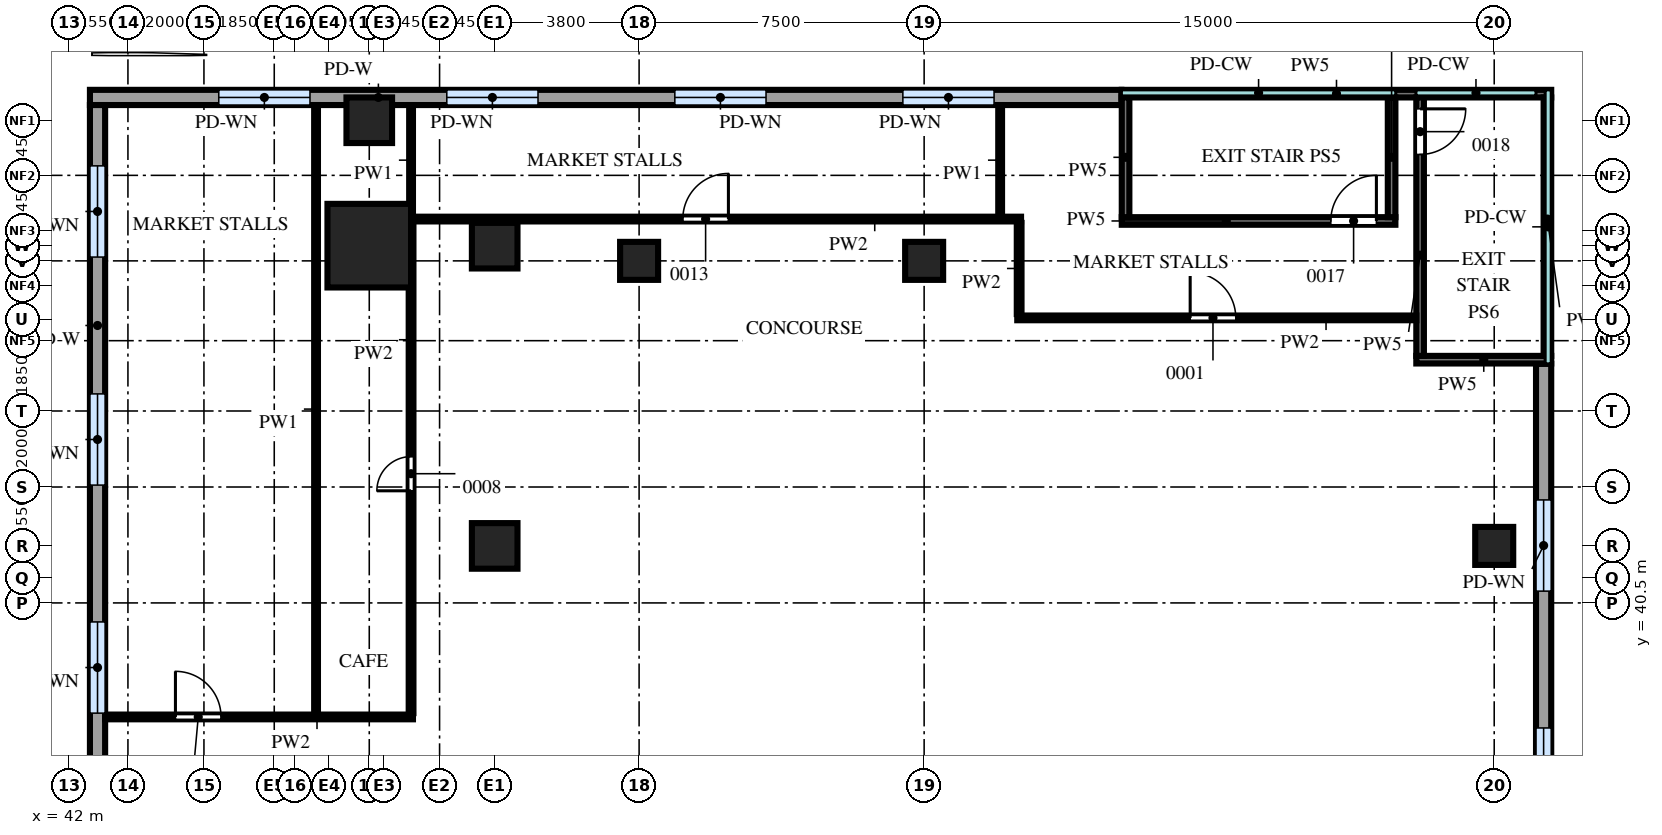
"""IFC4 building model, lengths in metres.
Left out: names, types, materials, properties, quantities, classifications, styles, units other than length and angle.
Written with IfcOpenShell. Run it as: python <this file> out.ifc"""

import sys

from ifc_helpers import new_model, si_unit, direction, frame, frame_2d, origin, origin_2d, place, context, subcontext, project, spatial, rectangle, extrude, source, transform, mapped, element, fill, save


model = new_model("IFC4")
c1 = context("Model", 3, precision=1e-05, world=origin(), true_north=direction((0.0, 1.0)))
c2 = subcontext(c1, "Body", "Model", "MODEL_VIEW")
j1 = project(units=[si_unit("LENGTHUNIT", "METRE"), si_unit("PLANEANGLEUNIT", "RADIAN")], contexts=[c1])
p1 = place(None, origin())
s1 = spatial("IfcSite", under=j1, at=p1, CompositionType="ELEMENT")
p2 = place(p1, origin())
s2 = spatial("IfcBuilding", under=s1, at=p2, CompositionType="ELEMENT")
p3 = place(p2, frame((0.0, 0.0, 7.5)))
s3 = spatial("IfcBuildingStorey", under=s2, at=p3, CompositionType="ELEMENT", Elevation=7.5)
m1 = source(origin(), c2, "Body", "SweptSolid", [
    extrude(rectangle(XDim=2.2, YDim=2.2, at=origin_2d()), origin(), (0.0, 0.0, 1.0), 5.2),
])
p4 = place(p3, frame((49.9, 49.9, 0.0), z_axis=(0.0, 0.0, 1.0), x_axis=(1.0, 0.0, 0.0)))
e1 = element("IfcColumn", 1, at=p4, inside=s3, PredefinedType="COLUMN", context=c2, shape_type="MappedRepresentation", body=[
    mapped(m1, transform((0.0, 0.0, 0.0))),
])
m2 = source(origin(), c2, "Body", "SweptSolid", [
    extrude(rectangle(XDim=1.2, YDim=1.2, at=origin_2d()), origin(), (0.0, 0.0, 1.0), 5.2),
])
for number, where, z_axis, x_axis in (
    (2, (53.2, 42.0, 0.0), (0.0, 0.0, 1.0), (1.0, 0.0, 0.0)),
    (3, (53.2, 49.9, 0.0), (0.0, 0.0, 1.0), (1.0, 0.0, 0.0)),
    (4, (49.9, 53.2, 0.0), (0.0, 0.0, 1.0), (1.0, 0.0, 0.0)),
):
    element("IfcColumn", number, at=place(p3, frame(where, z_axis=z_axis, x_axis=x_axis)), inside=s3, PredefinedType="COLUMN", context=c2, shape_type="MappedRepresentation", body=[
        mapped(m2, transform((0.0, 0.0, 0.0))),
    ])
m3 = source(origin(), c2, "Body", "SweptSolid", [
    extrude(rectangle(XDim=1.0, YDim=1.0, at=origin_2d()), origin(), (0.0, 0.0, 1.0), 5.2),
])
for number, where, z_axis, x_axis in (
    (5, (57.0, 49.5, 0.0), (0.0, 0.0, 1.0), (1.0, 0.0, 0.0)),
    (6, (64.5, 49.5, 0.0), (0.0, 0.0, 1.0), (1.0, 0.0, 0.0)),
    (7, (79.5, 42.0, 0.0), (0.0, 0.0, 1.0), (1.0, 0.0, 0.0)),
):
    element("IfcColumn", number, at=place(p3, frame(where, z_axis=z_axis, x_axis=x_axis)), inside=s3, PredefinedType="COLUMN", context=c2, shape_type="MappedRepresentation", body=[
        mapped(m3, transform((0.0, 0.0, 0.0))),
    ])
m4 = source(origin(), c2, "Body", "SweptSolid", [
    extrude(rectangle(XDim=39.58, YDim=0.4, at=frame_2d((19.79, 0.0))), origin(), (0.0, 0.0, 1.0), 5.2),
])
p5 = place(p3, frame((80.8, 7.21, 0.0), z_axis=(0.0, 0.0, 1.0), x_axis=(0.0, 1.0, 0.0)))
e8 = element("IfcWall", 8, at=p5, inside=s3, PredefinedType="SOLIDWALL", context=c2, shape_type="MappedRepresentation", body=[
    mapped(m4, transform((0.0, 0.0, 0.0))),
])
m5 = source(origin(), c2, "Body", "SweptSolid", [
    extrude(rectangle(XDim=2.4, YDim=2.4, at=frame_2d((1.2, 1.2))), frame((0.0, 0.21, 0.0), z_axis=(0.0, -1.0, 0.0), x_axis=(1.0, 0.0, 0.0)), (0.0, 0.0, 1.0), 0.42),
])
p6 = place(p5, frame((3.6, 0.0, 1.0)))
e9 = element("IfcOpeningElement", 9, at=p6, cuts=e8, PredefinedType="OPENING", context=c2, shape_type="MappedRepresentation", body=[
    mapped(m5, transform((0.0, 0.0, 0.0))),
])
p7 = place(p5, frame((9.6, 0.0, 1.0)))
e10 = element("IfcOpeningElement", 10, at=p7, cuts=e8, PredefinedType="OPENING", context=c2, shape_type="MappedRepresentation", body=[
    mapped(m5, transform((0.0, 0.0, 0.0))),
])
p8 = place(p5, frame((15.6, 0.0, 1.0)))
e11 = element("IfcOpeningElement", 11, at=p8, cuts=e8, PredefinedType="OPENING", context=c2, shape_type="MappedRepresentation", body=[
    mapped(m5, transform((0.0, 0.0, 0.0))),
])
p9 = place(p5, frame((21.6, 0.0, 1.0)))
e12 = element("IfcOpeningElement", 12, at=p9, cuts=e8, PredefinedType="OPENING", context=c2, shape_type="MappedRepresentation", body=[
    mapped(m5, transform((0.0, 0.0, 0.0))),
])
p10 = place(p5, frame((27.6, 0.0, 1.0)))
e13 = element("IfcOpeningElement", 13, at=p10, cuts=e8, PredefinedType="OPENING", context=c2, shape_type="MappedRepresentation", body=[
    mapped(m5, transform((0.0, 0.0, 0.0))),
])
p11 = place(p5, frame((33.6, 0.0, 1.0)))
e14 = element("IfcOpeningElement", 14, at=p11, cuts=e8, PredefinedType="OPENING", context=c2, shape_type="MappedRepresentation", body=[
    mapped(m5, transform((0.0, 0.0, 0.0))),
])
m6 = source(origin(), c2, "Body", "SweptSolid", [
    extrude(rectangle(XDim=27.14, YDim=0.4, at=frame_2d((13.57, 0.0))), origin(), (0.0, 0.0, 1.0), 5.2),
])
p12 = place(p3, frame((69.69, 53.8, 0.0), z_axis=(0.0, 0.0, 1.0), x_axis=(-1.0, 0.0, 0.0)))
e15 = element("IfcWall", 15, at=p12, inside=s3, PredefinedType="SOLIDWALL", context=c2, shape_type="MappedRepresentation", body=[
    mapped(m6, transform((0.0, 0.0, 0.0))),
])
p13 = place(p12, frame((3.35, 0.0, 1.0)))
e16 = element("IfcOpeningElement", 16, at=p13, cuts=e15, PredefinedType="OPENING", context=c2, shape_type="MappedRepresentation", body=[
    mapped(m5, transform((0.0, 0.0, 0.0))),
])
p14 = place(p12, frame((9.35, 0.0, 1.0)))
e17 = element("IfcOpeningElement", 17, at=p14, cuts=e15, PredefinedType="OPENING", context=c2, shape_type="MappedRepresentation", body=[
    mapped(m5, transform((0.0, 0.0, 0.0))),
])
p15 = place(p12, frame((15.35, 0.0, 1.0)))
e18 = element("IfcOpeningElement", 18, at=p15, cuts=e15, PredefinedType="OPENING", context=c2, shape_type="MappedRepresentation", body=[
    mapped(m5, transform((0.0, 0.0, 0.0))),
])
p16 = place(p12, frame((21.35, 0.0, 1.0)))
e19 = element("IfcOpeningElement", 19, at=p16, cuts=e15, PredefinedType="OPENING", context=c2, shape_type="MappedRepresentation", body=[
    mapped(m5, transform((0.0, 0.0, 0.0))),
])
m7 = source(origin(), c2, "Body", "SweptSolid", [
    extrude(rectangle(XDim=17.6, YDim=0.4, at=frame_2d((8.8, 0.0))), origin(), (0.0, 0.0, 1.0), 5.2),
])
p17 = place(p3, frame((42.75, 53.6, 0.0), z_axis=(0.0, 0.0, 1.0), x_axis=(0.0, -1.0, 0.0)))
e20 = element("IfcWall", 20, at=p17, inside=s3, PredefinedType="SOLIDWALL", context=c2, shape_type="MappedRepresentation", body=[
    mapped(m7, transform((0.0, 0.0, 0.0))),
])
p18 = place(p17, frame((1.6, 0.0, 1.0)))
e21 = element("IfcOpeningElement", 21, at=p18, cuts=e20, PredefinedType="OPENING", context=c2, shape_type="MappedRepresentation", body=[
    mapped(m5, transform((0.0, 0.0, 0.0))),
])
p19 = place(p17, frame((7.6, 0.0, 1.0)))
e22 = element("IfcOpeningElement", 22, at=p19, cuts=e20, PredefinedType="OPENING", context=c2, shape_type="MappedRepresentation", body=[
    mapped(m5, transform((0.0, 0.0, 0.0))),
])
p20 = place(p17, frame((13.6, 0.0, 1.0)))
e23 = element("IfcOpeningElement", 23, at=p20, cuts=e20, PredefinedType="OPENING", context=c2, shape_type="MappedRepresentation", body=[
    mapped(m5, transform((0.0, 0.0, 0.0))),
])
m8 = source(origin(), c2, "Body", "SweptSolid", [
    extrude(rectangle(XDim=7.2, YDim=0.2, at=frame_2d((3.6, 0.0))), origin(), (0.0, 0.0, 1.0), 5.2),
])
p21 = place(p3, frame((69.7, 50.55, 0.0), z_axis=(0.0, 0.0, 1.0), x_axis=(1.0, 0.0, 0.0)))
e24 = element("IfcWall", 24, at=p21, inside=s3, PredefinedType="PARTITIONING", context=c2, shape_type="MappedRepresentation", body=[
    mapped(m8, transform((0.0, 0.0, 0.0))),
])
m9 = source(origin(), c2, "Body", "SweptSolid", [
    extrude(rectangle(XDim=1.2, YDim=2.1, at=frame_2d((0.6, 1.05))), frame((0.0, 0.11, 0.0), z_axis=(0.0, -1.0, 0.0), x_axis=(1.0, 0.0, 0.0)), (0.0, 0.0, 1.0), 0.22),
])
p22 = place(p21, frame((5.5, 0.0, 0.0)))
e25 = element("IfcOpeningElement", 25, at=p22, cuts=e24, PredefinedType="OPENING", context=c2, shape_type="MappedRepresentation", body=[
    mapped(m9, transform((0.0, 0.0, 0.0))),
])
m10 = source(origin(), c2, "Body", "SweptSolid", [
    extrude(rectangle(XDim=11.3, YDim=0.2, at=frame_2d((5.65, 0.0))), origin(), (0.0, 0.0, 1.0), 5.2),
])
p23 = place(p3, frame((69.7, 53.9, 0.0), z_axis=(0.0, 0.0, 1.0), x_axis=(1.0, 0.0, 0.0)))
e26 = element("IfcWall", 26, at=p23, inside=s3, PredefinedType="PARTITIONING", context=c2, shape_type="MappedRepresentation", body=[
    mapped(m10, transform((0.0, 0.0, 0.0))),
])
m11 = source(origin(), c2, "Body", "SweptSolid", [
    extrude(rectangle(XDim=3.15, YDim=0.2, at=frame_2d((1.575, 0.0))), origin(), (0.0, 0.0, 1.0), 5.2),
])
for number, where, z_axis, x_axis in (
    (27, (69.8, 50.65, 0.0), (0.0, 0.0, 1.0), (0.0, 1.0, 0.0)),
    (28, (76.8, 50.65, 0.0), (0.0, 0.0, 1.0), (0.0, 1.0, 0.0)),
):
    element("IfcWall", number, at=place(p3, frame(where, z_axis=z_axis, x_axis=x_axis)), inside=s3, PredefinedType="PARTITIONING", context=c2, shape_type="MappedRepresentation", body=[
        mapped(m11, transform((0.0, 0.0, 0.0))),
    ])
m12 = source(origin(), c2, "Body", "SweptSolid", [
    extrude(rectangle(XDim=3.55, YDim=0.2, at=frame_2d((1.775, 0.0))), origin(), (0.0, 0.0, 1.0), 5.2),
])
p24 = place(p3, frame((77.45, 46.9, 0.0), z_axis=(0.0, 0.0, 1.0), x_axis=(1.0, 0.0, 0.0)))
e29 = element("IfcWall", 29, at=p24, inside=s3, PredefinedType="PARTITIONING", context=c2, shape_type="MappedRepresentation", body=[
    mapped(m12, transform((0.0, 0.0, 0.0))),
])
m13 = source(origin(), c2, "Body", "SweptSolid", [
    extrude(rectangle(XDim=6.8, YDim=0.2, at=frame_2d((3.4, 0.0))), origin(), (0.0, 0.0, 1.0), 5.2),
])
p25 = place(p3, frame((77.55, 47.0, 0.0), z_axis=(0.0, 0.0, 1.0), x_axis=(0.0, 1.0, 0.0)))
e30 = element("IfcWall", 30, at=p25, inside=s3, PredefinedType="PARTITIONING", context=c2, shape_type="MappedRepresentation", body=[
    mapped(m13, transform((0.0, 0.0, 0.0))),
])
p26 = place(p25, frame((5.3, 0.0, 0.0)))
e31 = element("IfcOpeningElement", 31, at=p26, cuts=e30, PredefinedType="OPENING", context=c2, shape_type="MappedRepresentation", body=[
    mapped(m9, transform((0.0, 0.0, 0.0))),
])
p27 = place(p3, frame((80.9, 47.0, 0.0), z_axis=(0.0, 0.0, 1.0), x_axis=(0.0, 1.0, 0.0)))
e32 = element("IfcWall", 32, at=p27, inside=s3, PredefinedType="PARTITIONING", context=c2, shape_type="MappedRepresentation", body=[
    mapped(m13, transform((0.0, 0.0, 0.0))),
])
m14 = source(origin(), c2, "Body", "SweptSolid", [
    extrude(rectangle(XDim=8.1, YDim=0.125, at=frame_2d((4.05, 0.0))), origin(), (0.0, 0.0, 1.0), 5.2),
])
p28 = place(p3, frame((42.95, 37.5, 0.0), z_axis=(0.0, 0.0, 1.0), x_axis=(1.0, 0.0, 0.0)))
e33 = element("IfcWall", 33, at=p28, inside=s3, PredefinedType="PARTITIONING", context=c2, shape_type="MappedRepresentation", body=[
    mapped(m14, transform((0.0, 0.0, 0.0))),
])
m15 = source(origin(), c2, "Body", "SweptSolid", [
    extrude(rectangle(XDim=1.2, YDim=2.1, at=frame_2d((0.6, 1.05))), frame((0.0, 0.073, 0.0), z_axis=(0.0, -1.0, 0.0), x_axis=(1.0, 0.0, 0.0)), (0.0, 0.0, 1.0), 0.145),
])
p29 = place(p28, frame((1.85, 0.0, 0.0)))
e34 = element("IfcOpeningElement", 34, at=p29, cuts=e33, PredefinedType="OPENING", context=c2, shape_type="MappedRepresentation", body=[
    mapped(m15, transform((0.0, 0.0, 0.0))),
])
m16 = source(origin(), c2, "Body", "SweptSolid", [
    extrude(rectangle(XDim=16.0, YDim=0.1, at=frame_2d((8.0, 0.0))), origin(), (0.0, 0.0, 1.0), 5.2),
])
p30 = place(p3, frame((48.5, 37.6, 0.0), z_axis=(0.0, 0.0, 1.0), x_axis=(0.0, 1.0, 0.0)))
e35 = element("IfcWall", 35, at=p30, inside=s3, PredefinedType="PARTITIONING", context=c2, shape_type="MappedRepresentation", body=[
    mapped(m16, transform((0.0, 0.0, 0.0))),
])
m17 = source(origin(), c2, "Body", "SweptSolid", [
    extrude(rectangle(XDim=12.9, YDim=0.125, at=frame_2d((6.45, 0.0))), origin(), (0.0, 0.0, 1.0), 5.2),
])
p31 = place(p3, frame((51.0, 37.6, 0.0), z_axis=(0.0, 0.0, 1.0), x_axis=(0.0, 1.0, 0.0)))
e36 = element("IfcWall", 36, at=p31, inside=s3, PredefinedType="PARTITIONING", context=c2, shape_type="MappedRepresentation", body=[
    mapped(m17, transform((0.0, 0.0, 0.0))),
])
m18 = source(origin(), c2, "Body", "SweptSolid", [
    extrude(rectangle(XDim=0.9, YDim=2.1, at=frame_2d((0.45, 1.05))), frame((0.0, 0.073, 0.0), z_axis=(0.0, -1.0, 0.0), x_axis=(1.0, 0.0, 0.0)), (0.0, 0.0, 1.0), 0.145),
])
p32 = place(p31, frame((5.85, 0.0, 0.0)))
e37 = element("IfcOpeningElement", 37, at=p32, cuts=e36, PredefinedType="OPENING", context=c2, shape_type="MappedRepresentation", body=[
    mapped(m18, transform((0.0, 0.0, 0.0))),
])
m19 = source(origin(), c2, "Body", "SweptSolid", [
    extrude(rectangle(XDim=10.5, YDim=0.125, at=frame_2d((5.25, 0.0))), origin(), (0.0, 0.0, 1.0), 5.2),
])
p33 = place(p3, frame((66.95, 48.0, 0.0), z_axis=(0.0, 0.0, 1.0), x_axis=(1.0, 0.0, 0.0)))
e38 = element("IfcWall", 38, at=p33, inside=s3, PredefinedType="PARTITIONING", context=c2, shape_type="MappedRepresentation", body=[
    mapped(m19, transform((0.0, 0.0, 0.0))),
])
p34 = place(p33, frame((4.55, 0.0, 0.0)))
e39 = element("IfcOpeningElement", 39, at=p34, cuts=e38, PredefinedType="OPENING", context=c2, shape_type="MappedRepresentation", body=[
    mapped(m15, transform((0.0, 0.0, 0.0))),
])
m20 = source(origin(), c2, "Body", "SweptSolid", [
    extrude(rectangle(XDim=2.4, YDim=0.125, at=frame_2d((1.2, 0.0))), origin(), (0.0, 0.0, 1.0), 5.2),
])
p35 = place(p3, frame((67.0, 48.1, 0.0), z_axis=(0.0, 0.0, 1.0), x_axis=(0.0, 1.0, 0.0)))
e40 = element("IfcWall", 40, at=p35, inside=s3, PredefinedType="PARTITIONING", context=c2, shape_type="MappedRepresentation", body=[
    mapped(m20, transform((0.0, 0.0, 0.0))),
])
m21 = source(origin(), c2, "Body", "SweptSolid", [
    extrude(rectangle(XDim=16.1, YDim=0.125, at=frame_2d((8.05, 0.0))), origin(), (0.0, 0.0, 1.0), 5.2),
])
p36 = place(p3, frame((50.95, 50.6, 0.0), z_axis=(0.0, 0.0, 1.0), x_axis=(1.0, 0.0, 0.0)))
e41 = element("IfcWall", 41, at=p36, inside=s3, PredefinedType="PARTITIONING", context=c2, shape_type="MappedRepresentation", body=[
    mapped(m21, transform((0.0, 0.0, 0.0))),
])
p37 = place(p36, frame((7.2, 0.0, 0.0)))
e42 = element("IfcOpeningElement", 42, at=p37, cuts=e41, PredefinedType="OPENING", context=c2, shape_type="MappedRepresentation", body=[
    mapped(m15, transform((0.0, 0.0, 0.0))),
])
m22 = source(origin(), c2, "Body", "SweptSolid", [
    extrude(rectangle(XDim=2.9, YDim=0.1, at=frame_2d((1.45, 0.0))), origin(), (0.0, 0.0, 1.0), 5.2),
])
for number, where, z_axis, x_axis in (
    (43, (51.0, 50.7, 0.0), (0.0, 0.0, 1.0), (0.0, 1.0, 0.0)),
    (44, (66.5, 50.7, 0.0), (0.0, 0.0, 1.0), (0.0, 1.0, 0.0)),
):
    element("IfcWall", number, at=place(p3, frame(where, z_axis=z_axis, x_axis=x_axis)), inside=s3, PredefinedType="PARTITIONING", context=c2, shape_type="MappedRepresentation", body=[
        mapped(m22, transform((0.0, 0.0, 0.0))),
    ])
m23 = source(origin(), c2, "Body", "SweptSolid", [
    extrude(rectangle(XDim=2.4, YDim=2.4, at=frame_2d((1.2, 1.2))), frame((0.0, 0.03, 0.0), z_axis=(0.0, -1.0, 0.0), x_axis=(1.0, 0.0, 0.0)), (0.0, 0.0, 1.0), 0.06),
])
p38 = place(p10, origin())
e45 = element("IfcWindow", 45, at=p38, inside=s3, PartitioningType="SINGLE_PANEL", PredefinedType="WINDOW", context=c2, shape_type="MappedRepresentation", body=[
    mapped(m23, transform((0.0, 0.0, 0.0))),
])
fill(e13, e45)
p39 = place(p11, origin())
e46 = element("IfcWindow", 46, at=p39, inside=s3, PartitioningType="SINGLE_PANEL", PredefinedType="WINDOW", context=c2, shape_type="MappedRepresentation", body=[
    mapped(m23, transform((0.0, 0.0, 0.0))),
])
fill(e14, e46)
p40 = place(p13, origin())
e47 = element("IfcWindow", 47, at=p40, inside=s3, PartitioningType="SINGLE_PANEL", PredefinedType="WINDOW", context=c2, shape_type="MappedRepresentation", body=[
    mapped(m23, transform((0.0, 0.0, 0.0))),
])
fill(e16, e47)
p41 = place(p14, origin())
e48 = element("IfcWindow", 48, at=p41, inside=s3, PartitioningType="SINGLE_PANEL", PredefinedType="WINDOW", context=c2, shape_type="MappedRepresentation", body=[
    mapped(m23, transform((0.0, 0.0, 0.0))),
])
fill(e17, e48)
p42 = place(p15, origin())
e49 = element("IfcWindow", 49, at=p42, inside=s3, PartitioningType="SINGLE_PANEL", PredefinedType="WINDOW", context=c2, shape_type="MappedRepresentation", body=[
    mapped(m23, transform((0.0, 0.0, 0.0))),
])
fill(e18, e49)
p43 = place(p16, origin())
e50 = element("IfcWindow", 50, at=p43, inside=s3, PartitioningType="SINGLE_PANEL", PredefinedType="WINDOW", context=c2, shape_type="MappedRepresentation", body=[
    mapped(m23, transform((0.0, 0.0, 0.0))),
])
fill(e19, e50)
p44 = place(p18, origin())
e51 = element("IfcWindow", 51, at=p44, inside=s3, PartitioningType="SINGLE_PANEL", PredefinedType="WINDOW", context=c2, shape_type="MappedRepresentation", body=[
    mapped(m23, transform((0.0, 0.0, 0.0))),
])
fill(e21, e51)
p45 = place(p19, origin())
e52 = element("IfcWindow", 52, at=p45, inside=s3, PartitioningType="SINGLE_PANEL", PredefinedType="WINDOW", context=c2, shape_type="MappedRepresentation", body=[
    mapped(m23, transform((0.0, 0.0, 0.0))),
])
fill(e22, e52)
p46 = place(p20, origin())
e53 = element("IfcWindow", 53, at=p46, inside=s3, PartitioningType="SINGLE_PANEL", PredefinedType="WINDOW", context=c2, shape_type="MappedRepresentation", body=[
    mapped(m23, transform((0.0, 0.0, 0.0))),
])
fill(e23, e53)
m24 = source(origin(), c2, "Body", "SweptSolid", [
    extrude(rectangle(XDim=1.2, YDim=2.1, at=frame_2d((0.6, 1.05))), frame((0.0, 0.025, 0.0), z_axis=(0.0, -1.0, 0.0), x_axis=(1.0, 0.0, 0.0)), (0.0, 0.0, 1.0), 0.05),
])
p47 = place(p29, origin())
e54 = element("IfcDoor", 54, at=p47, inside=s3, OperationType="SINGLE_SWING_RIGHT", PredefinedType="DOOR", context=c2, shape_type="MappedRepresentation", body=[
    mapped(m24, transform((0.0, 0.0, 0.0))),
])
fill(e34, e54)
m25 = source(origin(), c2, "Body", "SweptSolid", [
    extrude(rectangle(XDim=0.9, YDim=2.1, at=frame_2d((0.45, 1.05))), frame((0.0, 0.025, 0.0), z_axis=(0.0, -1.0, 0.0), x_axis=(1.0, 0.0, 0.0)), (0.0, 0.0, 1.0), 0.05),
])
p48 = place(p32, origin())
e55 = element("IfcDoor", 55, at=p48, inside=s3, OperationType="SINGLE_SWING_RIGHT", PredefinedType="DOOR", context=c2, shape_type="MappedRepresentation", body=[
    mapped(m25, transform((0.0, 0.0, 0.0))),
])
fill(e37, e55)
p49 = place(p37, origin())
e56 = element("IfcDoor", 56, at=p49, inside=s3, OperationType="SINGLE_SWING_LEFT", PredefinedType="DOOR", context=c2, shape_type="MappedRepresentation", body=[
    mapped(m24, transform((0.0, 0.0, 0.0))),
])
fill(e42, e56)
p50 = place(p34, origin())
e57 = element("IfcDoor", 57, at=p50, inside=s3, OperationType="SINGLE_SWING_RIGHT", PredefinedType="DOOR", context=c2, shape_type="MappedRepresentation", body=[
    mapped(m24, transform((0.0, 0.0, 0.0))),
])
fill(e39, e57)
p51 = place(p22, origin())
e58 = element("IfcDoor", 58, at=p51, inside=s3, OperationType="SINGLE_SWING_LEFT", PredefinedType="DOOR", context=c2, shape_type="MappedRepresentation", body=[
    mapped(m24, transform((0.0, 0.0, 0.0))),
])
fill(e25, e58)
p52 = place(p26, origin())
e59 = element("IfcDoor", 59, at=p52, inside=s3, OperationType="SINGLE_SWING_RIGHT", PredefinedType="DOOR", context=c2, shape_type="MappedRepresentation", body=[
    mapped(m24, transform((0.0, 0.0, 0.0))),
])
fill(e31, e59)
save(model, sys.argv[1])
